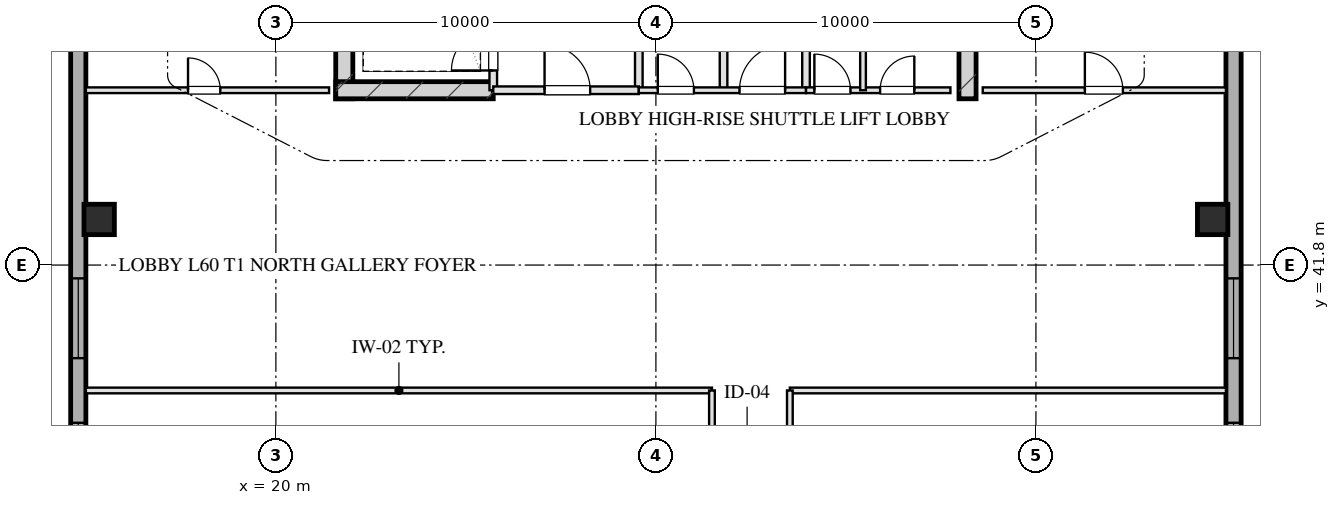
"""IFC4 building model, lengths in metres.
Left out: names, types, materials, properties, quantities, classifications, styles, units other than length and angle.
Written with IfcOpenShell. Run it as: python <this file> out.ifc"""

import sys

from ifc_helpers import new_model, si_unit, direction, frame, frame_2d, origin, origin_2d, place, context, subcontext, project, spatial, rectangle, hollow_rectangle, extrude, element, fill, save


model = new_model("IFC4")
c1 = context("Model", 3, precision=1e-05, world=origin(), true_north=direction((0.0, 1.0)))
c2 = subcontext(c1, "Body", "Model", "MODEL_VIEW")
j1 = project(units=[si_unit("LENGTHUNIT", "METRE"), si_unit("PLANEANGLEUNIT", "RADIAN")], contexts=[c1])
p1 = place(None, origin())
s1 = spatial("IfcSite", under=j1, at=p1, CompositionType="ELEMENT")
p2 = place(p1, origin())
s2 = spatial("IfcBuilding", under=s1, at=p2, CompositionType="ELEMENT")
p3 = place(p2, frame((0.0, 0.0, 223.1)))
s3 = spatial("IfcBuildingStorey", under=s2, at=p3, CompositionType="ELEMENT", Elevation=223.1)
for number, where, z_axis, x_axis in (
    (1, (21.8, 46.175, 0.0), (0.0, 0.0, 1.0), (0.0, 1.0, 0.0)),
    (2, (38.2, 46.175, 0.0), (0.0, 0.0, 1.0), (0.0, 1.0, 0.0)),
):
    element("IfcWall", number, at=place(p3, frame(where, z_axis=z_axis, x_axis=x_axis)), inside=s3, PredefinedType="SHEAR", context=c2, shape_type="SweptSolid", body=[
        extrude(rectangle(XDim=9.33, YDim=0.45, at=frame_2d((4.665, 0.0))), origin(), (0.0, 0.0, 1.0), 3.45),
    ])
p4 = place(p3, frame((21.575, 46.4, 0.0), z_axis=(0.0, 0.0, 1.0), x_axis=(1.0, 0.0, 0.0)))
e3 = element("IfcWall", 3, at=p4, inside=s3, PredefinedType="SHEAR", context=c2, shape_type="SweptSolid", body=[
    extrude(rectangle(XDim=4.145, YDim=0.45, at=frame_2d((2.073, 0.0))), origin(), (0.0, 0.0, 1.0), 3.45),
])
for number, where, z_axis, x_axis in (
    (4, (15.35, 43.0, 0.0), (0.0, 0.0, 1.0), (1.0, 0.0, 0.0)),
    (5, (44.65, 43.0, 0.0), (0.0, 0.0, 1.0), (1.0, 0.0, 0.0)),
):
    element("IfcColumn", number, at=place(p3, frame(where, z_axis=z_axis, x_axis=x_axis)), inside=s3, PredefinedType="COLUMN", context=c2, shape_type="SweptSolid", body=[
        extrude(hollow_rectangle(XDim=0.8, YDim=0.8, WallThickness=0.028, at=origin_2d()), origin(), (0.0, 0.0, 1.0), 3.451),
    ])
p5 = place(p3, frame((14.8, 13.1, 0.0), z_axis=(0.0, 0.0, 1.0), x_axis=(0.0, 1.0, 0.0)))
e6 = element("IfcWall", 6, at=p5, inside=s3, PredefinedType="SOLIDWALL", context=c2, shape_type="SweptSolid", body=[
    extrude(rectangle(XDim=41.8, YDim=0.4, at=frame_2d((20.9, 0.0))), origin(), (0.0, 0.0, 1.0), 2.61),
])
p6 = place(p5, frame((13.45, 0.0, 0.75)))
e7 = element("IfcOpeningElement", 7, at=p6, cuts=e6, PredefinedType="OPENING", context=c2, shape_type="SweptSolid", body=[
    extrude(rectangle(XDim=2.1, YDim=1.46, at=frame_2d((1.05, 0.73))), frame((0.0, 0.21, 0.0), z_axis=(0.0, -1.0, 0.0), x_axis=(1.0, 0.0, 0.0)), (0.0, 0.0, 1.0), 0.42),
])
p7 = place(p5, frame((17.25, 0.0, 0.75)))
e8 = element("IfcOpeningElement", 8, at=p7, cuts=e6, PredefinedType="OPENING", context=c2, shape_type="SweptSolid", body=[
    extrude(rectangle(XDim=2.1, YDim=1.46, at=frame_2d((1.05, 0.73))), frame((0.0, 0.21, 0.0), z_axis=(0.0, -1.0, 0.0), x_axis=(1.0, 0.0, 0.0)), (0.0, 0.0, 1.0), 0.42),
])
p8 = place(p5, frame((22.45, 0.0, 0.75)))
e9 = element("IfcOpeningElement", 9, at=p8, cuts=e6, PredefinedType="OPENING", context=c2, shape_type="SweptSolid", body=[
    extrude(rectangle(XDim=2.1, YDim=1.46, at=frame_2d((1.05, 0.73))), frame((0.0, 0.21, 0.0), z_axis=(0.0, -1.0, 0.0), x_axis=(1.0, 0.0, 0.0)), (0.0, 0.0, 1.0), 0.42),
])
p9 = place(p5, frame((26.25, 0.0, 0.75)))
e10 = element("IfcOpeningElement", 10, at=p9, cuts=e6, PredefinedType="OPENING", context=c2, shape_type="SweptSolid", body=[
    extrude(rectangle(XDim=2.1, YDim=1.46, at=frame_2d((1.05, 0.73))), frame((0.0, 0.21, 0.0), z_axis=(0.0, -1.0, 0.0), x_axis=(1.0, 0.0, 0.0)), (0.0, 0.0, 1.0), 0.42),
])
p10 = place(p3, frame((45.2, 54.9, 0.0), z_axis=(0.0, 0.0, 1.0), x_axis=(0.0, -1.0, 0.0)))
e11 = element("IfcWall", 11, at=p10, inside=s3, PredefinedType="SOLIDWALL", context=c2, shape_type="SweptSolid", body=[
    extrude(rectangle(XDim=41.8, YDim=0.4, at=frame_2d((20.9, 0.0))), origin(), (0.0, 0.0, 1.0), 2.61),
])
p11 = place(p10, frame((26.25, 0.0, 0.75)))
e12 = element("IfcOpeningElement", 12, at=p11, cuts=e11, PredefinedType="OPENING", context=c2, shape_type="SweptSolid", body=[
    extrude(rectangle(XDim=2.1, YDim=1.46, at=frame_2d((1.05, 0.73))), frame((0.0, 0.21, 0.0), z_axis=(0.0, -1.0, 0.0), x_axis=(1.0, 0.0, 0.0)), (0.0, 0.0, 1.0), 0.42),
])
p12 = place(p10, frame((22.45, 0.0, 0.75)))
e13 = element("IfcOpeningElement", 13, at=p12, cuts=e11, PredefinedType="OPENING", context=c2, shape_type="SweptSolid", body=[
    extrude(rectangle(XDim=2.1, YDim=1.46, at=frame_2d((1.05, 0.73))), frame((0.0, 0.21, 0.0), z_axis=(0.0, -1.0, 0.0), x_axis=(1.0, 0.0, 0.0)), (0.0, 0.0, 1.0), 0.42),
])
p13 = place(p10, frame((17.25, 0.0, 0.75)))
e14 = element("IfcOpeningElement", 14, at=p13, cuts=e11, PredefinedType="OPENING", context=c2, shape_type="SweptSolid", body=[
    extrude(rectangle(XDim=2.1, YDim=1.46, at=frame_2d((1.05, 0.73))), frame((0.0, 0.21, 0.0), z_axis=(0.0, -1.0, 0.0), x_axis=(1.0, 0.0, 0.0)), (0.0, 0.0, 1.0), 0.42),
])
p14 = place(p10, frame((13.45, 0.0, 0.75)))
e15 = element("IfcOpeningElement", 15, at=p14, cuts=e11, PredefinedType="OPENING", context=c2, shape_type="SweptSolid", body=[
    extrude(rectangle(XDim=2.1, YDim=1.46, at=frame_2d((1.05, 0.73))), frame((0.0, 0.21, 0.0), z_axis=(0.0, -1.0, 0.0), x_axis=(1.0, 0.0, 0.0)), (0.0, 0.0, 1.0), 0.42),
])
p15 = place(p3, frame((25.72, 46.4, 0.0), z_axis=(0.0, 0.0, 1.0), x_axis=(0.0, 1.0, 0.0)))
e16 = element("IfcWall", 16, at=p15, inside=s3, PredefinedType="PARTITIONING", context=c2, shape_type="SweptSolid", body=[
    extrude(rectangle(XDim=1.9, YDim=0.2, at=frame_2d((0.95, 0.0))), origin(), (0.0, 0.0, 1.0), 3.175),
])
p16 = place(p15, frame((0.52, 0.0, 0.0)))
e17 = element("IfcOpeningElement", 17, at=p16, cuts=e16, PredefinedType="OPENING", context=c2, shape_type="SweptSolid", body=[
    extrude(rectangle(XDim=1.1, YDim=2.05, at=frame_2d((0.55, 1.025))), frame((0.0, 0.11, 0.0), z_axis=(0.0, -1.0, 0.0), x_axis=(1.0, 0.0, 0.0)), (0.0, 0.0, 1.0), 0.22),
])
p17 = place(p3, frame((29.55, 46.4, 0.0), z_axis=(0.0, 0.0, 1.0), x_axis=(0.0, 1.0, 0.0)))
e18 = element("IfcWall", 18, at=p17, inside=s3, PredefinedType="PARTITIONING", context=c2, shape_type="SweptSolid", body=[
    extrude(rectangle(XDim=8.43, YDim=0.2, at=frame_2d((4.215, 0.0))), origin(), (0.0, 0.0, 1.0), 3.175),
])
p18 = place(p3, frame((25.72, 46.4, 0.0), z_axis=(0.0, 0.0, 1.0), x_axis=(1.0, 0.0, 0.0)))
e19 = element("IfcWall", 19, at=p18, inside=s3, PredefinedType="PARTITIONING", context=c2, shape_type="SweptSolid", body=[
    extrude(rectangle(XDim=3.83, YDim=0.2, at=frame_2d((1.915, 0.0))), origin(), (0.0, 0.0, 1.0), 3.175),
])
p19 = place(p18, frame((1.35, 0.0, 0.0)))
e20 = element("IfcOpeningElement", 20, at=p19, cuts=e19, PredefinedType="OPENING", context=c2, shape_type="SweptSolid", body=[
    extrude(rectangle(XDim=1.2, YDim=2.05, at=frame_2d((0.6, 1.025))), frame((0.0, 0.11, 0.0), z_axis=(0.0, -1.0, 0.0), x_axis=(1.0, 0.0, 0.0)), (0.0, 0.0, 1.0), 0.22),
])
for number, where, z_axis, x_axis in (
    (21, (33.95, 46.4, 0.0), (0.0, 0.0, 1.0), (0.0, 1.0, 0.0)),
    (22, (31.78, 46.4, 0.0), (0.0, 0.0, 1.0), (0.0, 1.0, 0.0)),
):
    element("IfcWall", number, at=place(p3, frame(where, z_axis=z_axis, x_axis=x_axis)), inside=s3, PredefinedType="PARTITIONING", context=c2, shape_type="SweptSolid", body=[
        extrude(rectangle(XDim=8.43, YDim=0.2, at=frame_2d((4.215, 0.0))), origin(), (0.0, 0.0, 1.0), 3.175),
    ])
p20 = place(p3, frame((29.55, 46.4, 0.0), z_axis=(0.0, 0.0, 1.0), x_axis=(1.0, 0.0, 0.0)))
e23 = element("IfcWall", 23, at=p20, inside=s3, PredefinedType="PARTITIONING", context=c2, shape_type="SweptSolid", body=[
    extrude(rectangle(XDim=4.4, YDim=0.15, at=frame_2d((2.2, 0.0))), origin(), (0.0, 0.0, 1.0), 3.175),
])
p21 = place(p20, frame((0.5, 0.0, 0.0)))
e24 = element("IfcOpeningElement", 24, at=p21, cuts=e23, PredefinedType="OPENING", context=c2, shape_type="SweptSolid", body=[
    extrude(rectangle(XDim=0.95, YDim=2.05, at=frame_2d((0.475, 1.025))), frame((0.0, 0.085, 0.0), z_axis=(0.0, -1.0, 0.0), x_axis=(1.0, 0.0, 0.0)), (0.0, 0.0, 1.0), 0.17),
])
p22 = place(p20, frame((2.65, 0.0, 0.0)))
e25 = element("IfcOpeningElement", 25, at=p22, cuts=e23, PredefinedType="OPENING", context=c2, shape_type="SweptSolid", body=[
    extrude(rectangle(XDim=1.2, YDim=2.05, at=frame_2d((0.6, 1.025))), frame((0.0, 0.085, 0.0), z_axis=(0.0, -1.0, 0.0), x_axis=(1.0, 0.0, 0.0)), (0.0, 0.0, 1.0), 0.17),
])
p23 = place(p3, frame((33.95, 46.4, 0.0), z_axis=(0.0, 0.0, 1.0), x_axis=(1.0, 0.0, 0.0)))
e26 = element("IfcWall", 26, at=p23, inside=s3, PredefinedType="PARTITIONING", context=c2, shape_type="SweptSolid", body=[
    extrude(rectangle(XDim=3.8, YDim=0.15, at=frame_2d((1.9, 0.0))), origin(), (0.0, 0.0, 1.0), 3.175),
])
p24 = place(p23, frame((0.22, 0.0, 0.0)))
e27 = element("IfcOpeningElement", 27, at=p24, cuts=e26, PredefinedType="OPENING", context=c2, shape_type="SweptSolid", body=[
    extrude(rectangle(XDim=0.95, YDim=2.05, at=frame_2d((0.475, 1.025))), frame((0.0, 0.085, 0.0), z_axis=(0.0, -1.0, 0.0), x_axis=(1.0, 0.0, 0.0)), (0.0, 0.0, 1.0), 0.17),
])
p25 = place(p23, frame((1.95, 0.0, 0.0)))
e28 = element("IfcOpeningElement", 28, at=p25, cuts=e26, PredefinedType="OPENING", context=c2, shape_type="SweptSolid", body=[
    extrude(rectangle(XDim=0.9, YDim=2.05, at=frame_2d((0.45, 1.025))), frame((0.0, 0.085, 0.0), z_axis=(0.0, -1.0, 0.0), x_axis=(1.0, 0.0, 0.0)), (0.0, 0.0, 1.0), 0.17),
])
p26 = place(p3, frame((35.45, 46.4, 0.0), z_axis=(0.0, 0.0, 1.0), x_axis=(0.0, 1.0, 0.0)))
e29 = element("IfcWall", 29, at=p26, inside=s3, PredefinedType="PARTITIONING", context=c2, shape_type="SweptSolid", body=[
    extrude(rectangle(XDim=8.43, YDim=0.15, at=frame_2d((4.215, 0.0))), origin(), (0.0, 0.0, 1.0), 2.765),
])
p27 = place(p26, frame((2.55, 0.0, 0.0)))
e30 = element("IfcOpeningElement", 30, at=p27, cuts=e29, PredefinedType="OPENING", context=c2, shape_type="SweptSolid", body=[
    extrude(rectangle(XDim=0.95, YDim=2.05, at=frame_2d((0.475, 1.025))), frame((0.0, 0.085, 0.0), z_axis=(0.0, -1.0, 0.0), x_axis=(1.0, 0.0, 0.0)), (0.0, 0.0, 1.0), 0.17),
])
p28 = place(p26, frame((5.6, 0.0, 0.0)))
e31 = element("IfcOpeningElement", 31, at=p28, cuts=e29, PredefinedType="OPENING", context=c2, shape_type="SweptSolid", body=[
    extrude(rectangle(XDim=0.9, YDim=2.05, at=frame_2d((0.45, 1.025))), frame((0.0, 0.085, 0.0), z_axis=(0.0, -1.0, 0.0), x_axis=(1.0, 0.0, 0.0)), (0.0, 0.0, 1.0), 0.17),
])
p29 = place(p3, frame((15.0, 46.4, 0.0), z_axis=(0.0, 0.0, 1.0), x_axis=(1.0, 0.0, 0.0)))
e32 = element("IfcWall", 32, at=p29, inside=s3, PredefinedType="PARTITIONING", context=c2, shape_type="SweptSolid", body=[
    extrude(rectangle(XDim=6.4, YDim=0.15, at=frame_2d((3.2, 0.0))), origin(), (0.0, 0.0, 1.0), 3.175),
])
p30 = place(p29, frame((2.688, 0.0, 0.0)))
e33 = element("IfcOpeningElement", 33, at=p30, cuts=e32, PredefinedType="OPENING", context=c2, shape_type="SweptSolid", body=[
    extrude(rectangle(XDim=0.85, YDim=2.05, at=frame_2d((0.425, 1.025))), frame((0.0, 0.085, 0.0), z_axis=(0.0, -1.0, 0.0), x_axis=(1.0, 0.0, 0.0)), (0.0, 0.0, 1.0), 0.17),
])
p31 = place(p3, frame((38.6, 46.4, 0.0), z_axis=(0.0, 0.0, 1.0), x_axis=(1.0, 0.0, 0.0)))
e34 = element("IfcWall", 34, at=p31, inside=s3, PredefinedType="PARTITIONING", context=c2, shape_type="SweptSolid", body=[
    extrude(rectangle(XDim=6.4, YDim=0.15, at=frame_2d((3.2, 0.0))), origin(), (0.0, 0.0, 1.0), 3.175),
])
p32 = place(p31, frame((2.688, 0.0, 0.0)))
e35 = element("IfcOpeningElement", 35, at=p32, cuts=e34, PredefinedType="OPENING", context=c2, shape_type="SweptSolid", body=[
    extrude(rectangle(XDim=1.0, YDim=2.05, at=frame_2d((0.5, 1.025))), frame((0.0, 0.085, 0.0), z_axis=(0.0, -1.0, 0.0), x_axis=(1.0, 0.0, 0.0)), (0.0, 0.0, 1.0), 0.17),
])
p33 = place(p3, frame((15.0, 38.5, 0.0), z_axis=(0.0, 0.0, 1.0), x_axis=(1.0, 0.0, 0.0)))
e36 = element("IfcWall", 36, at=p33, inside=s3, PredefinedType="PARTITIONING", context=c2, shape_type="SweptSolid", body=[
    extrude(rectangle(XDim=16.475, YDim=0.15, at=frame_2d((8.238, 0.0))), origin(), (0.0, 0.0, 1.0), 3.175),
])
p34 = place(p3, frame((33.525, 38.5, 0.0), z_axis=(0.0, 0.0, 1.0), x_axis=(1.0, 0.0, 0.0)))
e37 = element("IfcWall", 37, at=p34, inside=s3, PredefinedType="PARTITIONING", context=c2, shape_type="SweptSolid", body=[
    extrude(rectangle(XDim=11.475, YDim=0.15, at=frame_2d((5.738, 0.0))), origin(), (0.0, 0.0, 1.0), 3.175),
])
p35 = place(p3, frame((31.475, 29.5, 0.0), z_axis=(0.0, 0.0, 1.0), x_axis=(0.0, 1.0, 0.0)))
e38 = element("IfcWall", 38, at=p35, inside=s3, PredefinedType="PARTITIONING", context=c2, shape_type="SweptSolid", body=[
    extrude(rectangle(XDim=9.0, YDim=0.15, at=frame_2d((4.5, 0.0))), origin(), (0.0, 0.0, 1.0), 3.175),
])
p36 = place(p35, frame((1.165, 0.0, 0.0)))
e39 = element("IfcOpeningElement", 39, at=p36, cuts=e38, PredefinedType="OPENING", context=c2, shape_type="SweptSolid", body=[
    extrude(rectangle(XDim=1.05, YDim=2.05, at=frame_2d((0.525, 1.025))), frame((0.0, 0.085, 0.0), z_axis=(0.0, -1.0, 0.0), x_axis=(1.0, 0.0, 0.0)), (0.0, 0.0, 1.0), 0.17),
])
p37 = place(p35, frame((4.0, 0.0, 0.0)))
e40 = element("IfcOpeningElement", 40, at=p37, cuts=e38, PredefinedType="OPENING", context=c2, shape_type="SweptSolid", body=[
    extrude(rectangle(XDim=1.0, YDim=2.05, at=frame_2d((0.5, 1.025))), frame((0.0, 0.085, 0.0), z_axis=(0.0, -1.0, 0.0), x_axis=(1.0, 0.0, 0.0)), (0.0, 0.0, 1.0), 0.17),
])
p38 = place(p35, frame((6.835, 0.0, 0.0)))
e41 = element("IfcOpeningElement", 41, at=p38, cuts=e38, PredefinedType="OPENING", context=c2, shape_type="SweptSolid", body=[
    extrude(rectangle(XDim=1.0, YDim=2.05, at=frame_2d((0.5, 1.025))), frame((0.0, 0.085, 0.0), z_axis=(0.0, -1.0, 0.0), x_axis=(1.0, 0.0, 0.0)), (0.0, 0.0, 1.0), 0.17),
])
p39 = place(p3, frame((33.525, 29.5, 0.0), z_axis=(0.0, 0.0, 1.0), x_axis=(0.0, 1.0, 0.0)))
e42 = element("IfcWall", 42, at=p39, inside=s3, PredefinedType="PARTITIONING", context=c2, shape_type="SweptSolid", body=[
    extrude(rectangle(XDim=9.0, YDim=0.15, at=frame_2d((4.5, 0.0))), origin(), (0.0, 0.0, 1.0), 3.175),
])
p40 = place(p39, frame((2.335, 0.0, 0.0)))
e43 = element("IfcOpeningElement", 43, at=p40, cuts=e42, PredefinedType="OPENING", context=c2, shape_type="SweptSolid", body=[
    extrude(rectangle(XDim=1.0, YDim=2.05, at=frame_2d((0.5, 1.025))), frame((0.0, 0.085, 0.0), z_axis=(0.0, -1.0, 0.0), x_axis=(1.0, 0.0, 0.0)), (0.0, 0.0, 1.0), 0.17),
])
p41 = place(p39, frame((6.835, 0.0, 0.0)))
e44 = element("IfcOpeningElement", 44, at=p41, cuts=e42, PredefinedType="OPENING", context=c2, shape_type="SweptSolid", body=[
    extrude(rectangle(XDim=1.0, YDim=2.05, at=frame_2d((0.5, 1.025))), frame((0.0, 0.085, 0.0), z_axis=(0.0, -1.0, 0.0), x_axis=(1.0, 0.0, 0.0)), (0.0, 0.0, 1.0), 0.17),
])
p42 = place(p8, origin())
e45 = element("IfcWindow", 45, at=p42, inside=s3, PartitioningType="TRIPLE_PANEL_VERTICAL", PredefinedType="WINDOW", context=c2, shape_type="SweptSolid", body=[
    extrude(rectangle(XDim=2.1, YDim=1.46, at=frame_2d((1.05, 0.73))), frame((0.0, 0.03, 0.0), z_axis=(0.0, -1.0, 0.0), x_axis=(1.0, 0.0, 0.0)), (0.0, 0.0, 1.0), 0.06),
])
fill(e9, e45)
p43 = place(p9, origin())
e46 = element("IfcWindow", 46, at=p43, inside=s3, PartitioningType="TRIPLE_PANEL_VERTICAL", PredefinedType="WINDOW", context=c2, shape_type="SweptSolid", body=[
    extrude(rectangle(XDim=2.1, YDim=1.46, at=frame_2d((1.05, 0.73))), frame((0.0, 0.03, 0.0), z_axis=(0.0, -1.0, 0.0), x_axis=(1.0, 0.0, 0.0)), (0.0, 0.0, 1.0), 0.06),
])
fill(e10, e46)
p44 = place(p13, origin())
e47 = element("IfcWindow", 47, at=p44, inside=s3, PartitioningType="TRIPLE_PANEL_VERTICAL", PredefinedType="WINDOW", context=c2, shape_type="SweptSolid", body=[
    extrude(rectangle(XDim=2.1, YDim=1.46, at=frame_2d((1.05, 0.73))), frame((0.0, 0.03, 0.0), z_axis=(0.0, -1.0, 0.0), x_axis=(1.0, 0.0, 0.0)), (0.0, 0.0, 1.0), 0.06),
])
fill(e14, e47)
p45 = place(p14, origin())
e48 = element("IfcWindow", 48, at=p45, inside=s3, PartitioningType="TRIPLE_PANEL_VERTICAL", PredefinedType="WINDOW", context=c2, shape_type="SweptSolid", body=[
    extrude(rectangle(XDim=2.1, YDim=1.46, at=frame_2d((1.05, 0.73))), frame((0.0, 0.03, 0.0), z_axis=(0.0, -1.0, 0.0), x_axis=(1.0, 0.0, 0.0)), (0.0, 0.0, 1.0), 0.06),
])
fill(e15, e48)
p46 = place(p16, origin())
e49 = element("IfcDoor", 49, at=p46, inside=s3, OperationType="SINGLE_SWING_LEFT", PredefinedType="DOOR", context=c2, shape_type="SweptSolid", body=[
    extrude(rectangle(XDim=1.1, YDim=2.05, at=frame_2d((0.55, 1.025))), frame((0.0, 0.025, 0.0), z_axis=(0.0, -1.0, 0.0), x_axis=(1.0, 0.0, 0.0)), (0.0, 0.0, 1.0), 0.05),
])
fill(e17, e49)
p47 = place(p19, origin())
e50 = element("IfcDoor", 50, at=p47, inside=s3, OperationType="SINGLE_SWING_LEFT", PredefinedType="DOOR", context=c2, shape_type="SweptSolid", body=[
    extrude(rectangle(XDim=1.2, YDim=2.05, at=frame_2d((0.6, 1.025))), frame((0.0, 0.025, 0.0), z_axis=(0.0, -1.0, 0.0), x_axis=(1.0, 0.0, 0.0)), (0.0, 0.0, 1.0), 0.05),
])
fill(e20, e50)
p48 = place(p21, origin())
e51 = element("IfcDoor", 51, at=p48, inside=s3, OperationType="SINGLE_SWING_LEFT", PredefinedType="DOOR", context=c2, shape_type="SweptSolid", body=[
    extrude(rectangle(XDim=0.95, YDim=2.05, at=frame_2d((0.475, 1.025))), frame((0.0, 0.025, 0.0), z_axis=(0.0, -1.0, 0.0), x_axis=(1.0, 0.0, 0.0)), (0.0, 0.0, 1.0), 0.05),
])
fill(e24, e51)
p49 = place(p22, origin())
e52 = element("IfcDoor", 52, at=p49, inside=s3, OperationType="SINGLE_SWING_RIGHT", PredefinedType="DOOR", context=c2, shape_type="SweptSolid", body=[
    extrude(rectangle(XDim=1.2, YDim=2.05, at=frame_2d((0.6, 1.025))), frame((0.0, 0.025, 0.0), z_axis=(0.0, -1.0, 0.0), x_axis=(1.0, 0.0, 0.0)), (0.0, 0.0, 1.0), 0.05),
])
fill(e25, e52)
p50 = place(p24, origin())
e53 = element("IfcDoor", 53, at=p50, inside=s3, OperationType="SINGLE_SWING_LEFT", PredefinedType="DOOR", context=c2, shape_type="SweptSolid", body=[
    extrude(rectangle(XDim=0.95, YDim=2.05, at=frame_2d((0.475, 1.025))), frame((0.0, 0.025, 0.0), z_axis=(0.0, -1.0, 0.0), x_axis=(1.0, 0.0, 0.0)), (0.0, 0.0, 1.0), 0.05),
])
fill(e27, e53)
p51 = place(p25, origin())
e54 = element("IfcDoor", 54, at=p51, inside=s3, OperationType="SINGLE_SWING_RIGHT", PredefinedType="DOOR", context=c2, shape_type="SweptSolid", body=[
    extrude(rectangle(XDim=0.9, YDim=2.05, at=frame_2d((0.45, 1.025))), frame((0.0, 0.025, 0.0), z_axis=(0.0, -1.0, 0.0), x_axis=(1.0, 0.0, 0.0)), (0.0, 0.0, 1.0), 0.05),
])
fill(e28, e54)
p52 = place(p30, origin())
e55 = element("IfcDoor", 55, at=p52, inside=s3, OperationType="SINGLE_SWING_LEFT", PredefinedType="DOOR", context=c2, shape_type="SweptSolid", body=[
    extrude(rectangle(XDim=0.85, YDim=2.05, at=frame_2d((0.425, 1.025))), frame((0.0, 0.025, 0.0), z_axis=(0.0, -1.0, 0.0), x_axis=(1.0, 0.0, 0.0)), (0.0, 0.0, 1.0), 0.05),
])
fill(e33, e55)
p53 = place(p32, origin())
e56 = element("IfcDoor", 56, at=p53, inside=s3, OperationType="SINGLE_SWING_LEFT", PredefinedType="DOOR", context=c2, shape_type="SweptSolid", body=[
    extrude(rectangle(XDim=1.0, YDim=2.05, at=frame_2d((0.5, 1.025))), frame((0.0, 0.025, 0.0), z_axis=(0.0, -1.0, 0.0), x_axis=(1.0, 0.0, 0.0)), (0.0, 0.0, 1.0), 0.05),
])
fill(e35, e56)
save(model, sys.argv[1])
